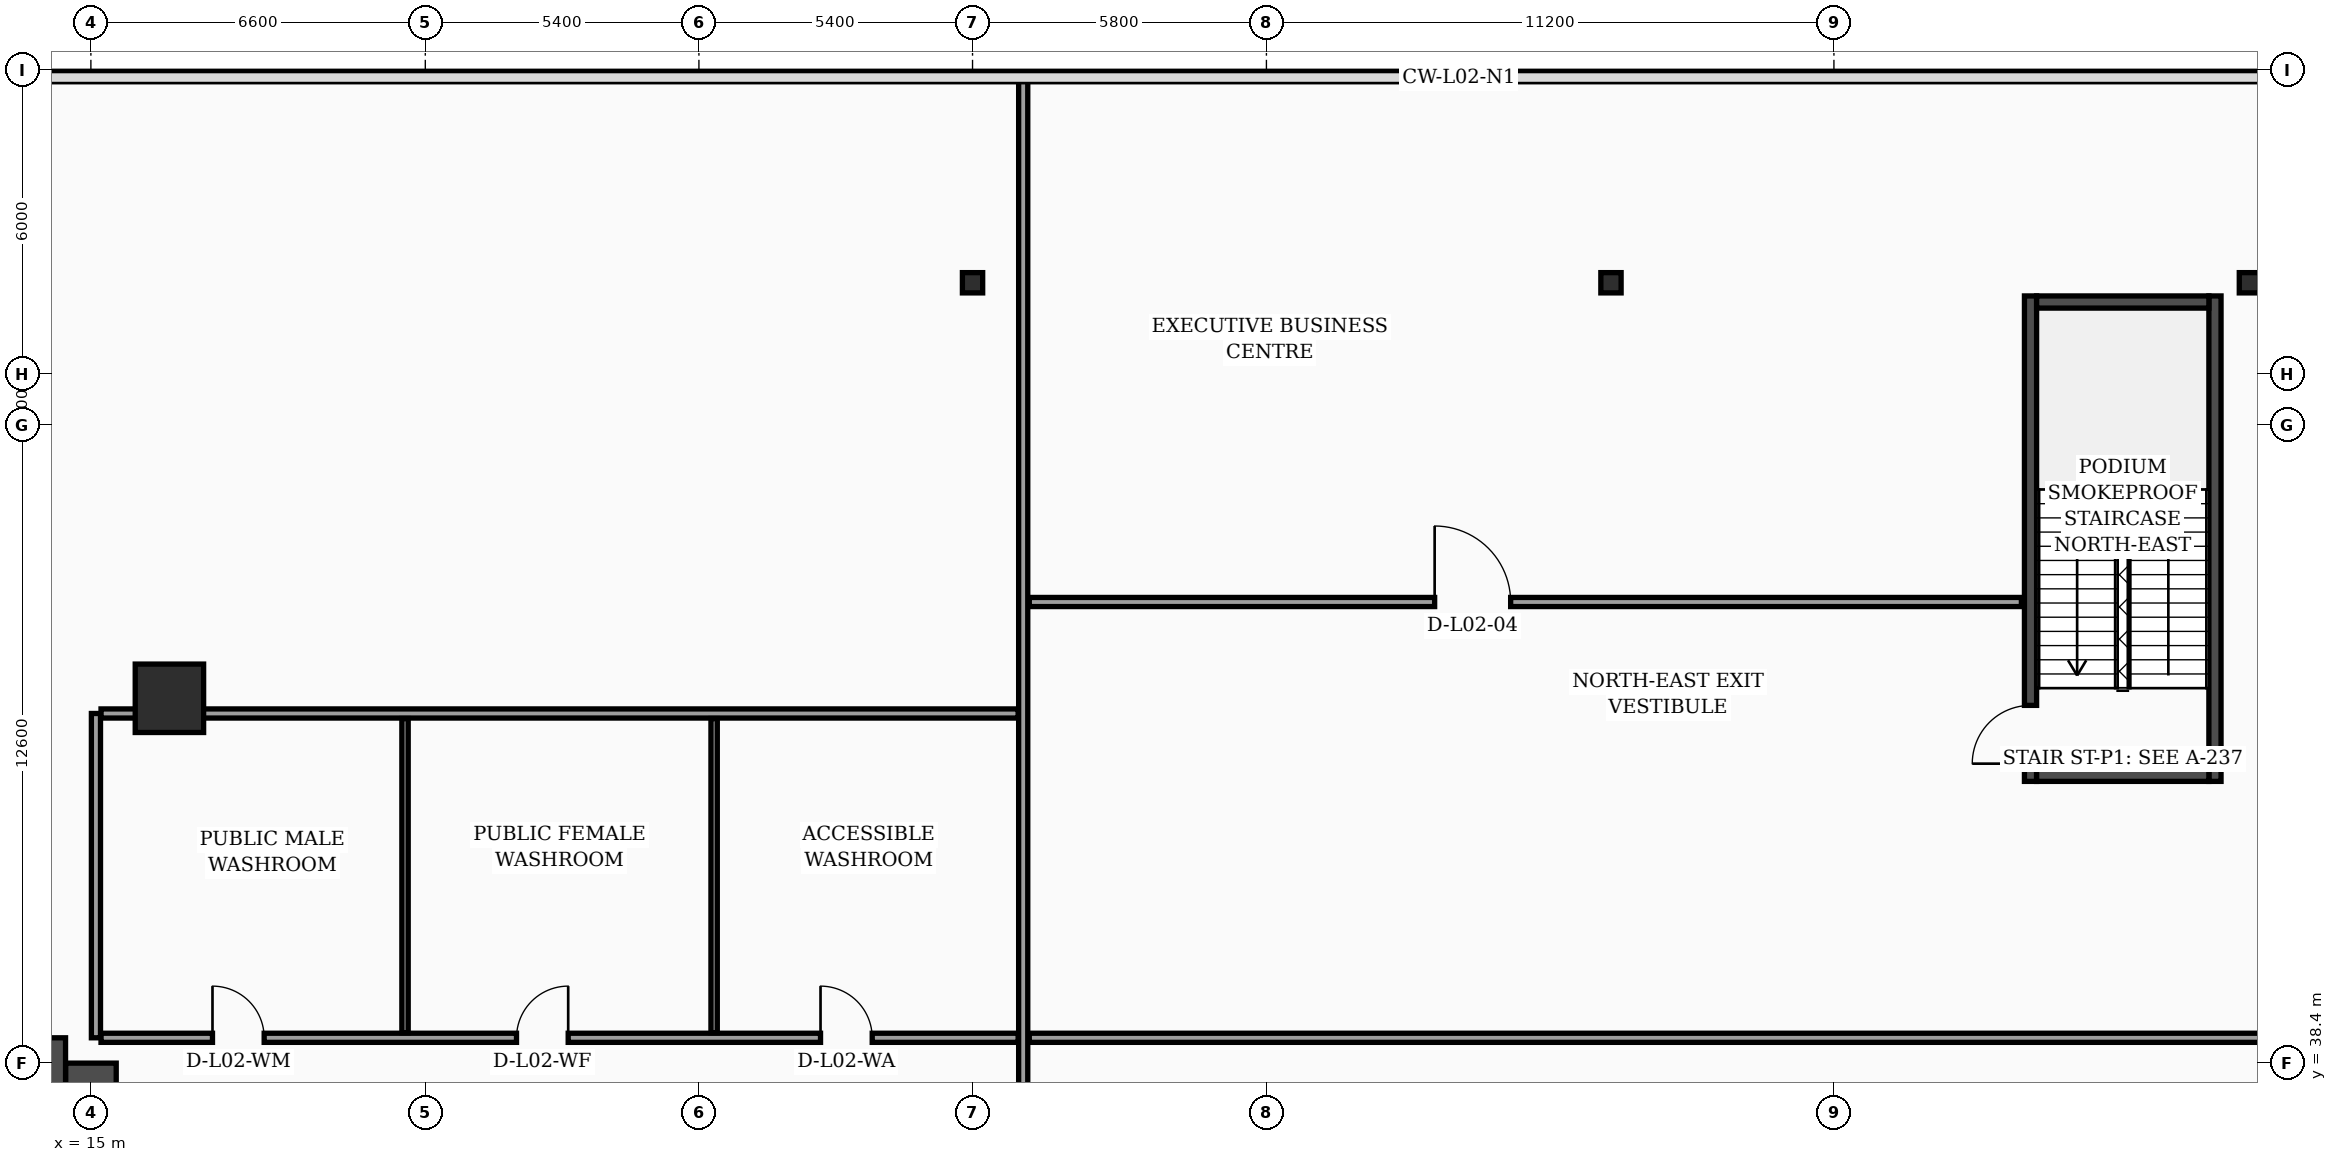
"""IFC4 building model, lengths in metres.
Left out: names, types, materials, properties, quantities, classifications, styles, units other than length and angle.
Written with IfcOpenShell. Run it as: python <this file> out.ifc"""

import sys

from ifc_helpers import new_model, si_unit, direction, frame, frame_2d, origin, origin_2d, place, context, subcontext, project, spatial, rectangle, i_section, extrude, element, fill, save


model = new_model("IFC4")
c1 = context("Model", 3, precision=1e-05, world=origin(), true_north=direction((0.0, 1.0)))
c2 = subcontext(c1, "Body", "Model", "MODEL_VIEW")
j1 = project(units=[si_unit("LENGTHUNIT", "METRE"), si_unit("PLANEANGLEUNIT", "RADIAN")], contexts=[c1])
p1 = place(None, origin())
s1 = spatial("IfcSite", under=j1, at=p1, CompositionType="ELEMENT")
p2 = place(p1, origin())
s2 = spatial("IfcBuilding", under=s1, at=p2, CompositionType="ELEMENT")
p3 = place(p2, frame((0.0, 0.0, 12.0)))
s3 = spatial("IfcBuildingStorey", under=s2, at=p3, CompositionType="ELEMENT", Elevation=12.0)
p4 = place(p3, frame((15.0, 16.8, 0.0), z_axis=(0.0, 0.0, 1.0), x_axis=(0.0, 1.0, 0.0)))
e1 = element("IfcWall", 1, at=p4, inside=s3, PredefinedType="SHEAR", context=c2, shape_type="SweptSolid", body=[
    extrude(rectangle(XDim=21.6, YDim=1.0, at=frame_2d((10.8, 0.0))), origin(), (0.0, 0.0, 1.0), 4.68),
])
p5 = place(p4, frame((8.65, 0.0, 0.0)))
e2 = element("IfcOpeningElement", 2, at=p5, cuts=e1, PredefinedType="OPENING", context=c2, shape_type="SweptSolid", body=[
    extrude(rectangle(XDim=1.1, YDim=2.2, at=frame_2d((0.55, 1.1))), frame((0.0, 0.51, 0.0), z_axis=(0.0, -1.0, 0.0), x_axis=(1.0, 0.0, 0.0)), (0.0, 0.0, 1.0), 1.02),
])
p6 = place(p4, frame((1.25, 0.0, 0.0)))
e3 = element("IfcOpeningElement", 3, at=p6, cuts=e1, PredefinedType="OPENING", context=c2, shape_type="SweptSolid", body=[
    extrude(rectangle(XDim=1.1, YDim=2.2, at=frame_2d((0.55, 1.1))), frame((0.0, 0.51, 0.0), z_axis=(0.0, -1.0, 0.0), x_axis=(1.0, 0.0, 0.0)), (0.0, 0.0, 1.0), 1.02),
])
p7 = place(p4, frame((3.8, 0.0, 0.0)))
e4 = element("IfcOpeningElement", 4, at=p7, cuts=e1, PredefinedType="OPENING", context=c2, shape_type="SweptSolid", body=[
    extrude(rectangle(XDim=1.1, YDim=2.2, at=frame_2d((0.55, 1.1))), frame((0.0, 0.51, 0.0), z_axis=(0.0, -1.0, 0.0), x_axis=(1.0, 0.0, 0.0)), (0.0, 0.0, 1.0), 1.02),
])
p8 = place(p4, frame((6.35, 0.0, 0.0)))
e5 = element("IfcOpeningElement", 5, at=p8, cuts=e1, PredefinedType="OPENING", context=c2, shape_type="SweptSolid", body=[
    extrude(rectangle(XDim=1.1, YDim=2.2, at=frame_2d((0.55, 1.1))), frame((0.0, 0.51, 0.0), z_axis=(0.0, -1.0, 0.0), x_axis=(1.0, 0.0, 0.0)), (0.0, 0.0, 1.0), 1.02),
])
p9 = place(p3, frame((4.7, 38.4, 0.0), z_axis=(0.0, 0.0, 1.0), x_axis=(1.0, 0.0, 0.0)))
e6 = element("IfcWall", 6, at=p9, inside=s3, PredefinedType="SHEAR", context=c2, shape_type="SweptSolid", body=[
    extrude(rectangle(XDim=9.8, YDim=1.0, at=frame_2d((4.9, 0.0))), origin(), (0.0, 0.0, 1.0), 4.68),
])
p10 = place(p3, frame((53.28, 43.96, 0.0), z_axis=(0.0, 0.0, 1.0), x_axis=(0.0, 1.0, 0.0)))
e7 = element("IfcWall", 7, at=p10, inside=s3, PredefinedType="SOLIDWALL", context=c2, shape_type="SweptSolid", body=[
    extrude(rectangle(XDim=9.58, YDim=0.24, at=frame_2d((4.79, 0.0))), origin(), (0.0, 0.0, 1.0), 4.68),
])
p11 = place(p10, frame((0.35, 0.0, 0.0)))
e8 = element("IfcOpeningElement", 8, at=p11, cuts=e7, PredefinedType="OPENING", context=c2, shape_type="SweptSolid", body=[
    extrude(rectangle(XDim=1.15, YDim=2.2, at=frame_2d((0.575, 1.1))), frame((0.0, 0.13, 0.0), z_axis=(0.0, -1.0, 0.0), x_axis=(1.0, 0.0, 0.0)), (0.0, 0.0, 1.0), 0.26),
])
p12 = place(p3, frame((56.92, 43.96, 0.0), z_axis=(0.0, 0.0, 1.0), x_axis=(0.0, 1.0, 0.0)))
e9 = element("IfcWall", 9, at=p12, inside=s3, PredefinedType="SOLIDWALL", context=c2, shape_type="SweptSolid", body=[
    extrude(rectangle(XDim=9.58, YDim=0.24, at=frame_2d((4.79, 0.0))), origin(), (0.0, 0.0, 1.0), 4.68),
])
for number, where, z_axis, x_axis in (
    (10, (53.4, 44.08, 0.0), (0.0, 0.0, 1.0), (1.0, 0.0, 0.0)),
    (11, (53.4, 53.42, 0.0), (0.0, 0.0, 1.0), (1.0, 0.0, 0.0)),
):
    element("IfcWall", number, at=place(p3, frame(where, z_axis=z_axis, x_axis=x_axis)), inside=s3, PredefinedType="SOLIDWALL", context=c2, shape_type="SweptSolid", body=[
        extrude(rectangle(XDim=3.4, YDim=0.24, at=frame_2d((1.7, 0.0))), origin(), (0.0, 0.0, 1.0), 4.68),
    ])
p13 = place(p3, frame((16.55, 45.6, 0.0), z_axis=(0.0, 0.0, 1.0), x_axis=(1.0, 0.0, 0.0)))
e12 = element("IfcColumn", 12, at=p13, inside=s3, PredefinedType="COLUMN", context=c2, shape_type="SweptSolid", body=[
    extrude(rectangle(XDim=1.35, YDim=1.35, at=origin_2d()), origin(), (0.0, 0.0, 1.0), 4.68),
])
for number, where, z_axis, x_axis in (
    (13, (32.4, 53.8, 0.0), (0.0, 0.0, 1.0), (1.0, 0.0, 0.0)),
    (14, (45.0, 53.8, 0.0), (0.0, 0.0, 1.0), (1.0, 0.0, 0.0)),
    (15, (57.6, 53.8, 0.0), (0.0, 0.0, 1.0), (1.0, 0.0, 0.0)),
):
    element("IfcColumn", number, at=place(p3, frame(where, z_axis=z_axis, x_axis=x_axis)), inside=s3, PredefinedType="PILASTER", context=c2, shape_type="SweptSolid", body=[
        extrude(i_section(OverallWidth=0.4, OverallDepth=0.4, WebThickness=0.013, FlangeThickness=0.021, FilletRadius=0.022, at=origin_2d()), origin(), (0.0, 0.0, 1.0), 4.68),
    ])
p14 = place(p3, frame((15.2, 38.9, 0.0), z_axis=(0.0, 0.0, 1.0), x_axis=(1.0, 0.0, 0.0)))
e16 = element("IfcWall", 16, at=p14, inside=s3, PredefinedType="PARTITIONING", context=c2, shape_type="SweptSolid", body=[
    extrude(rectangle(XDim=18.1, YDim=0.18, at=frame_2d((9.05, 0.0))), origin(), (0.0, 0.0, 1.0), 3.88),
])
p15 = place(p14, frame((2.2, 0.0, 0.0)))
e17 = element("IfcOpeningElement", 17, at=p15, cuts=e16, PredefinedType="OPENING", context=c2, shape_type="SweptSolid", body=[
    extrude(rectangle(XDim=1.02, YDim=2.2, at=frame_2d((0.51, 1.1))), frame((0.0, 0.1, 0.0), z_axis=(0.0, -1.0, 0.0), x_axis=(1.0, 0.0, 0.0)), (0.0, 0.0, 1.0), 0.2),
])
p16 = place(p14, frame((8.2, 0.0, 0.0)))
e18 = element("IfcOpeningElement", 18, at=p16, cuts=e16, PredefinedType="OPENING", context=c2, shape_type="SweptSolid", body=[
    extrude(rectangle(XDim=1.02, YDim=2.2, at=frame_2d((0.51, 1.1))), frame((0.0, 0.1, 0.0), z_axis=(0.0, -1.0, 0.0), x_axis=(1.0, 0.0, 0.0)), (0.0, 0.0, 1.0), 0.2),
])
p17 = place(p14, frame((14.2, 0.0, 0.0)))
e19 = element("IfcOpeningElement", 19, at=p17, cuts=e16, PredefinedType="OPENING", context=c2, shape_type="SweptSolid", body=[
    extrude(rectangle(XDim=1.02, YDim=2.2, at=frame_2d((0.51, 1.1))), frame((0.0, 0.1, 0.0), z_axis=(0.0, -1.0, 0.0), x_axis=(1.0, 0.0, 0.0)), (0.0, 0.0, 1.0), 0.2),
])
p18 = place(p3, frame((15.2, 45.3, 0.0), z_axis=(0.0, 0.0, 1.0), x_axis=(1.0, 0.0, 0.0)))
e20 = element("IfcWall", 20, at=p18, inside=s3, PredefinedType="PARTITIONING", context=c2, shape_type="SweptSolid", body=[
    extrude(rectangle(XDim=18.1, YDim=0.18, at=frame_2d((9.05, 0.0))), origin(), (0.0, 0.0, 1.0), 3.88),
])
p19 = place(p3, frame((15.1, 38.9, 0.0), z_axis=(0.0, 0.0, 1.0), x_axis=(0.0, 1.0, 0.0)))
e21 = element("IfcWall", 21, at=p19, inside=s3, PredefinedType="PARTITIONING", context=c2, shape_type="SweptSolid", body=[
    extrude(rectangle(XDim=6.4, YDim=0.18, at=frame_2d((3.2, 0.0))), origin(), (0.0, 0.0, 1.0), 3.88),
])
p20 = place(p3, frame((21.2, 39.0, 0.0), z_axis=(0.0, 0.0, 1.0), x_axis=(0.0, 1.0, 0.0)))
e22 = element("IfcWall", 22, at=p20, inside=s3, PredefinedType="PARTITIONING", context=c2, shape_type="SweptSolid", body=[
    extrude(rectangle(XDim=6.2, YDim=0.125, at=frame_2d((3.1, 0.0))), origin(), (0.0, 0.0, 1.0), 3.88),
])
p21 = place(p3, frame((27.3, 39.0, 0.0), z_axis=(0.0, 0.0, 1.0), x_axis=(0.0, 1.0, 0.0)))
e23 = element("IfcWall", 23, at=p21, inside=s3, PredefinedType="PARTITIONING", context=c2, shape_type="SweptSolid", body=[
    extrude(rectangle(XDim=6.2, YDim=0.125, at=frame_2d((3.1, 0.0))), origin(), (0.0, 0.0, 1.0), 4.68),
])
p22 = place(p3, frame((33.4, 0.06, 0.0), z_axis=(0.0, 0.0, 1.0), x_axis=(0.0, 1.0, 0.0)))
e24 = element("IfcWall", 24, at=p22, inside=s3, PredefinedType="PARTITIONING", context=c2, shape_type="SweptSolid", body=[
    extrude(rectangle(XDim=57.88, YDim=0.18, at=frame_2d((28.94, 0.0))), origin(), (0.0, 0.0, 1.0), 3.88),
])
p23 = place(p22, frame((16.5, 0.0, 0.0)))
e25 = element("IfcOpeningElement", 25, at=p23, cuts=e24, PredefinedType="OPENING", context=c2, shape_type="SweptSolid", body=[
    extrude(rectangle(XDim=1.5, YDim=2.22, at=frame_2d((0.75, 1.11))), frame((0.0, 0.1, 0.0), z_axis=(0.0, -1.0, 0.0), x_axis=(1.0, 0.0, 0.0)), (0.0, 0.0, 1.0), 0.2),
])
p24 = place(p22, frame((30.0, 0.0, 0.0)))
e26 = element("IfcOpeningElement", 26, at=p24, cuts=e24, PredefinedType="OPENING", context=c2, shape_type="SweptSolid", body=[
    extrude(rectangle(XDim=1.6, YDim=2.35, at=frame_2d((0.8, 1.175))), frame((0.0, 0.1, 0.0), z_axis=(0.0, -1.0, 0.0), x_axis=(1.0, 0.0, 0.0)), (0.0, 0.0, 1.0), 0.2),
])
p25 = place(p3, frame((33.52, 38.9, 0.0), z_axis=(0.0, 0.0, 1.0), x_axis=(1.0, 0.0, 0.0)))
e27 = element("IfcWall", 27, at=p25, inside=s3, PredefinedType="PARTITIONING", context=c2, shape_type="SweptSolid", body=[
    extrude(rectangle(XDim=50.42, YDim=0.18, at=frame_2d((25.21, 0.0))), origin(), (0.0, 0.0, 1.0), 3.88),
])
p26 = place(p3, frame((33.52, 47.5, 0.0), z_axis=(0.0, 0.0, 1.0), x_axis=(1.0, 0.0, 0.0)))
e28 = element("IfcWall", 28, at=p26, inside=s3, PredefinedType="PARTITIONING", context=c2, shape_type="SweptSolid", body=[
    extrude(rectangle(XDim=19.58, YDim=0.18, at=frame_2d((9.79, 0.0))), origin(), (0.0, 0.0, 1.0), 3.88),
])
p27 = place(p26, frame((8.0, 0.0, 0.0)))
e29 = element("IfcOpeningElement", 29, at=p27, cuts=e28, PredefinedType="OPENING", context=c2, shape_type="SweptSolid", body=[
    extrude(rectangle(XDim=1.5, YDim=2.22, at=frame_2d((0.75, 1.11))), frame((0.0, 0.1, 0.0), z_axis=(0.0, -1.0, 0.0), x_axis=(1.0, 0.0, 0.0)), (0.0, 0.0, 1.0), 0.2),
])
p28 = place(p15, origin())
e30 = element("IfcDoor", 30, at=p28, inside=s3, OperationType="SINGLE_SWING_LEFT", PredefinedType="DOOR", context=c2, shape_type="SweptSolid", body=[
    extrude(rectangle(XDim=1.02, YDim=2.2, at=frame_2d((0.51, 1.1))), frame((0.0, 0.025, 0.0), z_axis=(0.0, -1.0, 0.0), x_axis=(1.0, 0.0, 0.0)), (0.0, 0.0, 1.0), 0.05),
])
fill(e17, e30)
p29 = place(p16, origin())
e31 = element("IfcDoor", 31, at=p29, inside=s3, OperationType="SINGLE_SWING_RIGHT", PredefinedType="DOOR", context=c2, shape_type="SweptSolid", body=[
    extrude(rectangle(XDim=1.02, YDim=2.2, at=frame_2d((0.51, 1.1))), frame((0.0, 0.025, 0.0), z_axis=(0.0, -1.0, 0.0), x_axis=(1.0, 0.0, 0.0)), (0.0, 0.0, 1.0), 0.05),
])
fill(e18, e31)
p30 = place(p17, origin())
e32 = element("IfcDoor", 32, at=p30, inside=s3, OperationType="SINGLE_SWING_LEFT", PredefinedType="DOOR", context=c2, shape_type="SweptSolid", body=[
    extrude(rectangle(XDim=1.02, YDim=2.2, at=frame_2d((0.51, 1.1))), frame((0.0, 0.025, 0.0), z_axis=(0.0, -1.0, 0.0), x_axis=(1.0, 0.0, 0.0)), (0.0, 0.0, 1.0), 0.05),
])
fill(e19, e32)
p31 = place(p27, origin())
e33 = element("IfcDoor", 33, at=p31, inside=s3, OperationType="SINGLE_SWING_LEFT", PredefinedType="DOOR", context=c2, shape_type="SweptSolid", body=[
    extrude(rectangle(XDim=1.5, YDim=2.22, at=frame_2d((0.75, 1.11))), frame((0.0, 0.025, 0.0), z_axis=(0.0, -1.0, 0.0), x_axis=(1.0, 0.0, 0.0)), (0.0, 0.0, 1.0), 0.05),
])
fill(e29, e33)
p32 = place(p11, origin())
e34 = element("IfcDoor", 34, at=p32, inside=s3, OperationType="SINGLE_SWING_LEFT", PredefinedType="DOOR", context=c2, shape_type="SweptSolid", body=[
    extrude(rectangle(XDim=1.15, YDim=2.2, at=frame_2d((0.575, 1.1))), frame((0.0, 0.025, 0.0), z_axis=(0.0, -1.0, 0.0), x_axis=(1.0, 0.0, 0.0)), (0.0, 0.0, 1.0), 0.05),
])
fill(e8, e34)
save(model, sys.argv[1])
